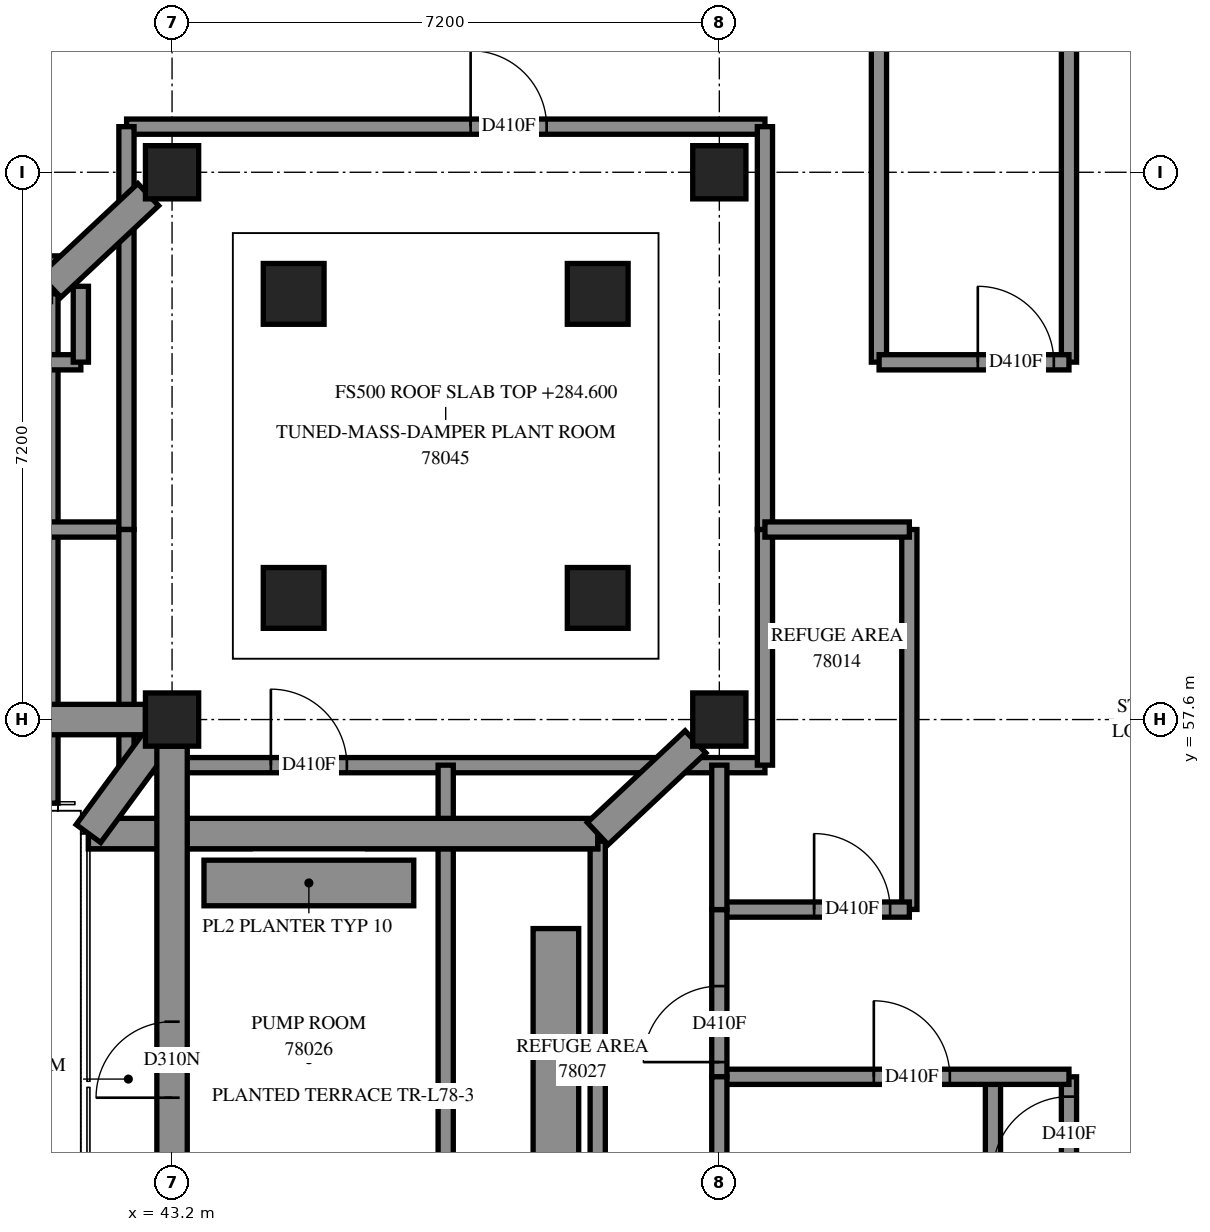
"""IFC4 building model, lengths in metres.
Left out: names, types, materials, properties, quantities, classifications, styles, units other than length and angle.
Written with IfcOpenShell. Run it as: python <this file> out.ifc"""

import sys

from ifc_helpers import new_model, si_unit, direction, frame, frame_2d, origin, origin_2d, place, context, subcontext, project, spatial, polyline, rectangle, outline, extrude, element, fill, save


model = new_model("IFC4")
c1 = context("Model", 3, precision=1e-05, world=origin(), true_north=direction((0.0, 1.0)))
c2 = subcontext(c1, "Body", "Model", "MODEL_VIEW")
j1 = project(units=[si_unit("LENGTHUNIT", "METRE"), si_unit("PLANEANGLEUNIT", "RADIAN")], contexts=[c1])
p1 = place(None, origin())
s1 = spatial("IfcSite", under=j1, at=p1, CompositionType="ELEMENT")
p2 = place(p1, origin())
s2 = spatial("IfcBuilding", under=s1, at=p2, CompositionType="ELEMENT")
p3 = place(p2, frame((0.0, 0.0, 284.6)))
s3 = spatial("IfcBuildingStorey", under=s2, at=p3, CompositionType="ELEMENT", Elevation=284.6)
for number, where, z_axis, x_axis in (
    (1, (43.2, 57.6, 0.0), (0.0, 0.0, 1.0), (1.0, 0.0, 0.0)),
    (2, (43.2, 64.8, 0.0), (0.0, 0.0, 1.0), (1.0, 0.0, 0.0)),
    (3, (50.4, 57.6, 0.0), (0.0, 0.0, 1.0), (1.0, 0.0, 0.0)),
    (4, (50.4, 64.8, 0.0), (0.0, 0.0, 1.0), (1.0, 0.0, 0.0)),
):
    element("IfcColumn", number, at=place(p3, frame(where, z_axis=z_axis, x_axis=x_axis)), inside=s3, PredefinedType="COLUMN", context=c2, shape_type="SweptSolid", body=[
        extrude(rectangle(XDim=0.7, YDim=0.7, at=origin_2d()), origin(), (0.0, 0.0, 1.0), 5.7),
    ])
for number, where, z_axis, x_axis in (
    (5, (44.8, 59.2, 0.5), (0.0, 0.0, 1.0), (1.0, 0.0, 0.0)),
    (6, (48.8, 59.2, 0.5), (0.0, 0.0, 1.0), (1.0, 0.0, 0.0)),
    (7, (48.8, 63.2, 0.5), (0.0, 0.0, 1.0), (1.0, 0.0, 0.0)),
    (8, (44.8, 63.2, 0.5), (0.0, 0.0, 1.0), (1.0, 0.0, 0.0)),
):
    element("IfcColumn", number, at=place(p3, frame(where, z_axis=z_axis, x_axis=x_axis)), inside=s3, PredefinedType="COLUMN", context=c2, shape_type="SweptSolid", body=[
        extrude(rectangle(XDim=0.8, YDim=0.8, at=origin_2d()), origin(), (0.0, 0.0, 1.0), 2.6),
    ])
p4 = place(p3, frame((41.6, 56.5, 0.0), z_axis=(0.0, 0.0, 1.0), x_axis=(0.0, 1.0, 0.0)))
e9 = element("IfcWall", 9, at=p4, inside=s3, PredefinedType="PARAPET", context=c2, shape_type="SweptSolid", body=[
    extrude(outline(polyline([(0.0, -0.1), (6.8, -0.1), (6.6, 0.1), (0.0, 0.1), (0.0, -0.1)])), origin(), (0.0, 0.0, 1.0), 0.25),
])
p5 = place(p3, frame((41.6, 63.2, 0.0), z_axis=(0.0, 0.0, 1.0), x_axis=(-1.0, 0.0, 0.0)))
e10 = element("IfcWall", 10, at=p5, inside=s3, PredefinedType="PARAPET", context=c2, shape_type="SweptSolid", body=[
    extrude(outline(polyline([(-0.1, -0.1), (6.7, -0.1), (6.7, 0.1), (0.1, 0.1), (-0.1, -0.1)])), origin(), (0.0, 0.0, 1.0), 0.25),
])
p6 = place(p3, frame((48.8, 49.3, 0.0), z_axis=(0.0, 0.0, 1.0), x_axis=(0.0, 1.0, 0.0)))
e11 = element("IfcWall", 11, at=p6, inside=s3, PredefinedType="PARAPET", context=c2, shape_type="SweptSolid", body=[
    extrude(outline(polyline([(0.0, -0.1), (6.8, -0.1), (6.6, 0.1), (0.0, 0.1), (0.0, -0.1)])), origin(), (0.0, 0.0, 1.0), 0.25),
])
p7 = place(p3, frame((48.25, 50.45, 0.0), z_axis=(0.0, 0.0, 1.0), x_axis=(0.0, 1.0, 0.0)))
e12 = element("IfcWall", 12, at=p7, inside=s3, PredefinedType="SOLIDWALL", context=c2, shape_type="SweptSolid", body=[
    extrude(rectangle(XDim=4.4, YDim=0.6, at=frame_2d((2.2, 0.0))), origin(), (0.0, 0.0, 1.0), 0.65),
])
p8 = place(p3, frame((46.38, 55.45, 0.0), z_axis=(0.0, 0.0, 1.0), x_axis=(-1.0, 0.0, 0.0)))
e13 = element("IfcWall", 13, at=p8, inside=s3, PredefinedType="SOLIDWALL", context=c2, shape_type="SweptSolid", body=[
    extrude(rectangle(XDim=2.76, YDim=0.6, at=frame_2d((1.38, 0.0))), origin(), (0.0, 0.0, 1.0), 0.65),
])
p9 = place(p3, frame((54.0, 42.13, 0.0), z_axis=(0.0, 0.0, 1.0), x_axis=(0.0, 1.0, 0.0)))
e14 = element("IfcWall", 14, at=p9, inside=s3, PredefinedType="PARTITIONING", context=c2, shape_type="SweptSolid", body=[
    extrude(rectangle(XDim=10.77, YDim=0.2, at=frame_2d((5.385, 0.0))), origin(), (0.0, 0.0, 1.0), 5.7),
])
p10 = place(p3, frame((42.6, 57.0, 0.0), z_axis=(0.0, 0.0, 1.0), x_axis=(1.0, 0.0, 0.0)))
e15 = element("IfcWall", 15, at=p10, inside=s3, PredefinedType="PARTITIONING", context=c2, shape_type="SweptSolid", body=[
    extrude(rectangle(XDim=8.4, YDim=0.2, at=frame_2d((4.2, 0.0))), origin(), (0.0, 0.0, 1.0), 5.2),
])
p11 = place(p10, frame((1.9, 0.0, 0.0)))
e16 = element("IfcOpeningElement", 16, at=p11, cuts=e15, PredefinedType="OPENING", context=c2, shape_type="SweptSolid", body=[
    extrude(rectangle(XDim=1.0, YDim=2.1, at=frame_2d((0.5, 1.05))), frame((0.0, 0.11, 0.0), z_axis=(0.0, -1.0, 0.0), x_axis=(1.0, 0.0, 0.0)), (0.0, 0.0, 1.0), 0.22),
])
p12 = place(p3, frame((42.602, 65.4, 0.0), z_axis=(0.0, 0.0, 1.0), x_axis=(1.0, 0.0, 0.0)))
e17 = element("IfcWall", 17, at=p12, inside=s3, PredefinedType="PARTITIONING", context=c2, shape_type="SweptSolid", body=[
    extrude(rectangle(XDim=8.398, YDim=0.2, at=frame_2d((4.199, 0.0))), origin(), (0.0, 0.0, 1.0), 5.7),
])
p13 = place(p12, frame((4.526, 0.0, 0.0)))
e18 = element("IfcOpeningElement", 18, at=p13, cuts=e17, PredefinedType="OPENING", context=c2, shape_type="SweptSolid", body=[
    extrude(rectangle(XDim=1.0, YDim=2.1, at=frame_2d((0.5, 1.05))), frame((0.0, 0.11, 0.0), z_axis=(0.0, -1.0, 0.0), x_axis=(1.0, 0.0, 0.0)), (0.0, 0.0, 1.0), 0.22),
])
p14 = place(p3, frame((46.8, 49.33, 0.0), z_axis=(0.0, 0.0, 1.0), x_axis=(0.0, 1.0, 0.0)))
e19 = element("IfcWall", 19, at=p14, inside=s3, PredefinedType="PARTITIONING", context=c2, shape_type="SweptSolid", body=[
    extrude(rectangle(XDim=7.67, YDim=0.2, at=frame_2d((3.835, 0.0))), origin(), (0.0, 0.0, 1.0), 5.7),
])
p15 = place(p3, frame((36.0, 60.1, 0.0), z_axis=(0.0, 0.0, 1.0), x_axis=(1.0, 0.0, 0.0)))
e20 = element("IfcWall", 20, at=p15, inside=s3, PredefinedType="PARTITIONING", context=c2, shape_type="SweptSolid", body=[
    extrude(rectangle(XDim=6.6, YDim=0.2, at=frame_2d((3.3, 0.0))), origin(), (0.0, 0.0, 1.0), 5.7),
])
p16 = place(p15, frame((2.033, 0.0, 0.0)))
e21 = element("IfcOpeningElement", 21, at=p16, cuts=e20, PredefinedType="OPENING", context=c2, shape_type="SweptSolid", body=[
    extrude(rectangle(XDim=1.0, YDim=2.1, at=frame_2d((0.5, 1.05))), frame((0.0, 0.11, 0.0), z_axis=(0.0, -1.0, 0.0), x_axis=(1.0, 0.0, 0.0)), (0.0, 0.0, 1.0), 0.22),
])
p17 = place(p15, frame((4.132, 0.0, 0.0)))
e22 = element("IfcOpeningElement", 22, at=p17, cuts=e20, PredefinedType="OPENING", context=c2, shape_type="SweptSolid", body=[
    extrude(rectangle(XDim=1.0, YDim=2.1, at=frame_2d((0.5, 1.05))), frame((0.0, 0.11, 0.0), z_axis=(0.0, -1.0, 0.0), x_axis=(1.0, 0.0, 0.0)), (0.0, 0.0, 1.0), 0.22),
])
p18 = place(p3, frame((43.2, 50.05, 0.0), z_axis=(0.0, 0.0, 1.0), x_axis=(0.0, 1.0, 0.0)))
e23 = element("IfcWall", 23, at=p18, inside=s3, PredefinedType="PARTITIONING", context=c2, shape_type="SweptSolid", body=[
    extrude(rectangle(XDim=6.95, YDim=0.2, at=frame_2d((3.475, 0.0))), origin(), (0.0, 0.0, 1.0), 5.7),
])
p19 = place(p18, frame((2.575, 0.0, 0.0)))
e24 = element("IfcOpeningElement", 24, at=p19, cuts=e23, PredefinedType="OPENING", context=c2, shape_type="SweptSolid", body=[
    extrude(rectangle(XDim=1.0, YDim=2.1, at=frame_2d((0.5, 1.05))), frame((0.0, 0.11, 0.0), z_axis=(0.0, -1.0, 0.0), x_axis=(1.0, 0.0, 0.0)), (0.0, 0.0, 1.0), 0.22),
])
p20 = place(p3, frame((51.0, 60.1, 0.0), z_axis=(0.0, 0.0, 1.0), x_axis=(0.0, 1.0, 0.0)))
e25 = element("IfcWall", 25, at=p20, inside=s3, PredefinedType="PARTITIONING", context=c2, shape_type="SweptSolid", body=[
    extrude(rectangle(XDim=5.3, YDim=0.2, at=frame_2d((2.65, 0.0))), origin(), (0.0, 0.0, 1.0), 5.7),
])
p21 = place(p3, frame((42.6, 60.1, 0.0), z_axis=(0.0, 0.0, 1.0), x_axis=(0.0, 1.0, 0.0)))
e26 = element("IfcWall", 26, at=p21, inside=s3, PredefinedType="PARTITIONING", context=c2, shape_type="SweptSolid", body=[
    extrude(rectangle(XDim=5.3, YDim=0.2, at=frame_2d((2.65, 0.0))), origin(), (0.0, 0.0, 1.0), 5.2),
])
p22 = place(p3, frame((55.0, 47.8, 0.0), z_axis=(0.0, 0.0, 1.0), x_axis=(0.0, 1.0, 0.0)))
e27 = element("IfcWall", 27, at=p22, inside=s3, PredefinedType="PARTITIONING", context=c2, shape_type="SweptSolid", body=[
    extrude(rectangle(XDim=5.1, YDim=0.2, at=frame_2d((2.55, 0.0))), origin(), (0.0, 0.0, 1.0), 5.7),
])
p23 = place(p22, frame((3.839, 0.0, 0.0)))
e28 = element("IfcOpeningElement", 28, at=p23, cuts=e27, PredefinedType="OPENING", context=c2, shape_type="SweptSolid", body=[
    extrude(rectangle(XDim=1.0, YDim=2.1, at=frame_2d((0.5, 1.05))), frame((0.0, 0.11, 0.0), z_axis=(0.0, -1.0, 0.0), x_axis=(1.0, 0.0, 0.0)), (0.0, 0.0, 1.0), 0.22),
])
p24 = place(p3, frame((55.0, 62.302, 0.0), z_axis=(0.0, 0.0, 1.0), x_axis=(0.0, 1.0, 0.0)))
e29 = element("IfcWall", 29, at=p24, inside=s3, PredefinedType="PARTITIONING", context=c2, shape_type="SweptSolid", body=[
    extrude(rectangle(XDim=5.098, YDim=0.2, at=frame_2d((2.549, 0.0))), origin(), (0.0, 0.0, 1.0), 5.7),
])
p25 = place(p3, frame((52.9, 55.102, 0.0), z_axis=(0.0, 0.0, 1.0), x_axis=(0.0, 1.0, 0.0)))
e30 = element("IfcWall", 30, at=p25, inside=s3, PredefinedType="PARTITIONING", context=c2, shape_type="SweptSolid", body=[
    extrude(rectangle(XDim=4.998, YDim=0.2, at=frame_2d((2.499, 0.0))), origin(), (0.0, 0.0, 1.0), 5.7),
])
p26 = place(p3, frame((52.5, 62.302, 0.0), z_axis=(0.0, 0.0, 1.0), x_axis=(0.0, 1.0, 0.0)))
e31 = element("IfcWall", 31, at=p26, inside=s3, PredefinedType="PARTITIONING", context=c2, shape_type="SweptSolid", body=[
    extrude(rectangle(XDim=4.798, YDim=0.2, at=frame_2d((2.399, 0.0))), origin(), (0.0, 0.0, 1.0), 5.7),
])
p27 = place(p3, frame((50.4, 52.9, 0.0), z_axis=(0.0, 0.0, 1.0), x_axis=(1.0, 0.0, 0.0)))
e32 = element("IfcWall", 32, at=p27, inside=s3, PredefinedType="PARTITIONING", context=c2, shape_type="SweptSolid", body=[
    extrude(rectangle(XDim=4.6, YDim=0.2, at=frame_2d((2.3, 0.0))), origin(), (0.0, 0.0, 1.0), 5.7),
])
p28 = place(p27, frame((2.033, 0.0, 0.0)))
e33 = element("IfcOpeningElement", 33, at=p28, cuts=e32, PredefinedType="OPENING", context=c2, shape_type="SweptSolid", body=[
    extrude(rectangle(XDim=1.0, YDim=2.1, at=frame_2d((0.5, 1.05))), frame((0.0, 0.11, 0.0), z_axis=(0.0, -1.0, 0.0), x_axis=(1.0, 0.0, 0.0)), (0.0, 0.0, 1.0), 0.22),
])
for number, where, z_axis, x_axis in (
    (34, (42.6, 57.0, 0.0), (0.0, 0.0, 1.0), (0.0, 1.0, 0.0)),
    (35, (51.0, 57.0, 0.0), (0.0, 0.0, 1.0), (0.0, 1.0, 0.0)),
):
    element("IfcWall", number, at=place(p3, frame(where, z_axis=z_axis, x_axis=x_axis)), inside=s3, PredefinedType="PARTITIONING", context=c2, shape_type="SweptSolid", body=[
        extrude(rectangle(XDim=3.1, YDim=0.2, at=frame_2d((1.55, 0.0))), origin(), (0.0, 0.0, 1.0), 5.7),
    ])
p29 = place(p3, frame((50.4, 55.1, 0.0), z_axis=(0.0, 0.0, 1.0), x_axis=(1.0, 0.0, 0.0)))
e36 = element("IfcWall", 36, at=p29, inside=s3, PredefinedType="PARTITIONING", context=c2, shape_type="SweptSolid", body=[
    extrude(rectangle(XDim=2.5, YDim=0.2, at=frame_2d((1.25, 0.0))), origin(), (0.0, 0.0, 1.0), 5.7),
])
p30 = place(p29, frame((1.247, 0.0, 0.0)))
e37 = element("IfcOpeningElement", 37, at=p30, cuts=e36, PredefinedType="OPENING", context=c2, shape_type="SweptSolid", body=[
    extrude(rectangle(XDim=1.0, YDim=2.1, at=frame_2d((0.5, 1.05))), frame((0.0, 0.11, 0.0), z_axis=(0.0, -1.0, 0.0), x_axis=(1.0, 0.0, 0.0)), (0.0, 0.0, 1.0), 0.22),
])
p31 = place(p3, frame((52.502, 62.3, 0.0), z_axis=(0.0, 0.0, 1.0), x_axis=(1.0, 0.0, 0.0)))
e38 = element("IfcWall", 38, at=p31, inside=s3, PredefinedType="PARTITIONING", context=c2, shape_type="SweptSolid", body=[
    extrude(rectangle(XDim=2.498, YDim=0.2, at=frame_2d((1.249, 0.0))), origin(), (0.0, 0.0, 1.0), 5.7),
])
p32 = place(p31, frame((1.299, 0.0, 0.0)))
e39 = element("IfcOpeningElement", 39, at=p32, cuts=e38, PredefinedType="OPENING", context=c2, shape_type="SweptSolid", body=[
    extrude(rectangle(XDim=1.0, YDim=2.1, at=frame_2d((0.5, 1.05))), frame((0.0, 0.11, 0.0), z_axis=(0.0, -1.0, 0.0), x_axis=(1.0, 0.0, 0.0)), (0.0, 0.0, 1.0), 0.22),
])
p33 = place(p3, frame((50.4, 52.9, 0.0), z_axis=(0.0, 0.0, 1.0), x_axis=(0.0, 1.0, 0.0)))
e40 = element("IfcWall", 40, at=p33, inside=s3, PredefinedType="PARTITIONING", context=c2, shape_type="SweptSolid", body=[
    extrude(rectangle(XDim=2.2, YDim=0.2, at=frame_2d((1.1, 0.0))), origin(), (0.0, 0.0, 1.0), 5.2),
])
p34 = place(p33, frame((0.193, 0.0, 0.0)))
e41 = element("IfcOpeningElement", 41, at=p34, cuts=e40, PredefinedType="OPENING", context=c2, shape_type="SweptSolid", body=[
    extrude(rectangle(XDim=1.0, YDim=2.1, at=frame_2d((0.5, 1.05))), frame((0.0, 0.11, 0.0), z_axis=(0.0, -1.0, 0.0), x_axis=(1.0, 0.0, 0.0)), (0.0, 0.0, 1.0), 0.22),
])
p35 = place(p3, frame((50.4, 50.75, 0.0), z_axis=(0.0, 0.0, 1.0), x_axis=(0.0, 1.0, 0.0)))
e42 = element("IfcWall", 42, at=p35, inside=s3, PredefinedType="PARTITIONING", context=c2, shape_type="SweptSolid", body=[
    extrude(rectangle(XDim=2.15, YDim=0.2, at=frame_2d((1.075, 0.0))), origin(), (0.0, 0.0, 1.0), 5.2),
])
p36 = place(p3, frame((51.0, 60.1, 0.0), z_axis=(0.0, 0.0, 1.0), x_axis=(1.0, 0.0, 0.0)))
e43 = element("IfcWall", 43, at=p36, inside=s3, PredefinedType="PARTITIONING", context=c2, shape_type="SweptSolid", body=[
    extrude(rectangle(XDim=1.9, YDim=0.2, at=frame_2d((0.95, 0.0))), origin(), (0.0, 0.0, 1.0), 5.7),
])
p37 = place(p3, frame((50.4, 55.1, 0.0), z_axis=(0.0, 0.0, 1.0), x_axis=(0.0, 1.0, 0.0)))
e44 = element("IfcWall", 44, at=p37, inside=s3, PredefinedType="PARTITIONING", context=c2, shape_type="SweptSolid", body=[
    extrude(rectangle(XDim=1.9, YDim=0.2, at=frame_2d((0.95, 0.0))), origin(), (0.0, 0.0, 1.0), 5.2),
])
p38 = place(p3, frame((40.702, 62.3, 0.0), z_axis=(0.0, 0.0, 1.0), x_axis=(1.0, 0.0, 0.0)))
e45 = element("IfcWall", 45, at=p38, inside=s3, PredefinedType="PARTITIONING", context=c2, shape_type="SweptSolid", body=[
    extrude(rectangle(XDim=1.298, YDim=0.2, at=frame_2d((0.649, 0.0))), origin(), (0.0, 0.0, 1.0), 5.7),
])
p39 = place(p3, frame((40.702, 63.6, 0.0), z_axis=(0.0, 0.0, 1.0), x_axis=(1.0, 0.0, 0.0)))
e46 = element("IfcWall", 46, at=p39, inside=s3, PredefinedType="PARTITIONING", context=c2, shape_type="SweptSolid", body=[
    extrude(rectangle(XDim=0.998, YDim=0.2, at=frame_2d((0.499, 0.0))), origin(), (0.0, 0.0, 1.0), 5.2),
])
p40 = place(p3, frame((42.0, 62.302, 0.0), z_axis=(0.0, 0.0, 1.0), x_axis=(0.0, 1.0, 0.0)))
e47 = element("IfcWall", 47, at=p40, inside=s3, PredefinedType="PARTITIONING", context=c2, shape_type="SweptSolid", body=[
    extrude(rectangle(XDim=0.998, YDim=0.2, at=frame_2d((0.499, 0.0))), origin(), (0.0, 0.0, 1.0), 5.7),
])
p41 = place(p3, frame((48.8, 56.0, 0.0), z_axis=(0.0, 0.0, 1.0), x_axis=(-1.0, 0.0, 0.0)))
e48 = element("IfcWall", 48, at=p41, inside=s3, PredefinedType="PARAPET", context=c2, shape_type="SweptSolid", body=[
    extrude(outline(polyline([(-0.1, -0.1), (3.03, -0.1), (3.03, 0.1), (0.1, 0.1), (-0.1, -0.1)])), origin(), (0.0, 0.0, 1.0), 0.25),
])
p42 = place(p3, frame((44.23, 56.0, 0.0), z_axis=(0.0, 0.0, 1.0), x_axis=(-1.0, 0.0, 0.0)))
e49 = element("IfcWall", 49, at=p42, inside=s3, PredefinedType="PARAPET", context=c2, shape_type="SweptSolid", body=[
    extrude(outline(polyline([(0.0, -0.1), (2.13, -0.1), (2.13, 0.1), (0.0, 0.1), (0.0, -0.1)])), origin(), (0.0, 0.0, 1.0), 0.25),
])
p43 = place(p30, origin())
e50 = element("IfcDoor", 50, at=p43, inside=s3, OperationType="SINGLE_SWING_RIGHT", PredefinedType="DOOR", context=c2, shape_type="SweptSolid", body=[
    extrude(rectangle(XDim=1.0, YDim=2.1, at=frame_2d((0.5, 1.05))), frame((0.0, 0.025, 0.0), z_axis=(0.0, -1.0, 0.0), x_axis=(1.0, 0.0, 0.0)), (0.0, 0.0, 1.0), 0.05),
])
fill(e37, e50)
p44 = place(p32, origin())
e51 = element("IfcDoor", 51, at=p44, inside=s3, OperationType="SINGLE_SWING_RIGHT", PredefinedType="DOOR", context=c2, shape_type="SweptSolid", body=[
    extrude(rectangle(XDim=1.0, YDim=2.1, at=frame_2d((0.5, 1.05))), frame((0.0, 0.025, 0.0), z_axis=(0.0, -1.0, 0.0), x_axis=(1.0, 0.0, 0.0)), (0.0, 0.0, 1.0), 0.05),
])
fill(e39, e51)
p45 = place(p34, origin())
e52 = element("IfcDoor", 52, at=p45, inside=s3, OperationType="SINGLE_SWING_LEFT", PredefinedType="DOOR", context=c2, shape_type="SweptSolid", body=[
    extrude(rectangle(XDim=1.0, YDim=2.1, at=frame_2d((0.5, 1.05))), frame((0.0, 0.025, 0.0), z_axis=(0.0, -1.0, 0.0), x_axis=(1.0, 0.0, 0.0)), (0.0, 0.0, 1.0), 0.05),
])
fill(e41, e52)
p46 = place(p28, origin())
e53 = element("IfcDoor", 53, at=p46, inside=s3, OperationType="SINGLE_SWING_LEFT", PredefinedType="DOOR", context=c2, shape_type="SweptSolid", body=[
    extrude(rectangle(XDim=1.0, YDim=2.1, at=frame_2d((0.5, 1.05))), frame((0.0, 0.025, 0.0), z_axis=(0.0, -1.0, 0.0), x_axis=(1.0, 0.0, 0.0)), (0.0, 0.0, 1.0), 0.05),
])
fill(e33, e53)
p47 = place(p23, origin())
e54 = element("IfcDoor", 54, at=p47, inside=s3, OperationType="SINGLE_SWING_RIGHT", PredefinedType="DOOR", context=c2, shape_type="SweptSolid", body=[
    extrude(rectangle(XDim=1.0, YDim=2.1, at=frame_2d((0.5, 1.05))), frame((0.0, 0.025, 0.0), z_axis=(0.0, -1.0, 0.0), x_axis=(1.0, 0.0, 0.0)), (0.0, 0.0, 1.0), 0.05),
])
fill(e28, e54)
p48 = place(p13, origin())
e55 = element("IfcDoor", 55, at=p48, inside=s3, OperationType="SINGLE_SWING_LEFT", PredefinedType="DOOR", context=c2, shape_type="SweptSolid", body=[
    extrude(rectangle(XDim=1.0, YDim=2.1, at=frame_2d((0.5, 1.05))), frame((0.0, 0.025, 0.0), z_axis=(0.0, -1.0, 0.0), x_axis=(1.0, 0.0, 0.0)), (0.0, 0.0, 1.0), 0.05),
])
fill(e18, e55)
p49 = place(p11, origin())
e56 = element("IfcDoor", 56, at=p49, inside=s3, OperationType="SINGLE_SWING_LEFT", PredefinedType="DOOR", context=c2, shape_type="SweptSolid", body=[
    extrude(rectangle(XDim=1.0, YDim=2.1, at=frame_2d((0.5, 1.05))), frame((0.0, 0.025, 0.0), z_axis=(0.0, -1.0, 0.0), x_axis=(1.0, 0.0, 0.0)), (0.0, 0.0, 1.0), 0.05),
])
fill(e16, e56)
p50 = place(p19, origin())
e57 = element("IfcDoor", 57, at=p50, inside=s3, OperationType="SINGLE_SWING_LEFT", PredefinedType="DOOR", context=c2, shape_type="SweptSolid", body=[
    extrude(rectangle(XDim=1.0, YDim=2.1, at=frame_2d((0.5, 1.05))), frame((0.0, 0.025, 0.0), z_axis=(0.0, -1.0, 0.0), x_axis=(1.0, 0.0, 0.0)), (0.0, 0.0, 1.0), 0.05),
])
fill(e24, e57)
save(model, sys.argv[1])
